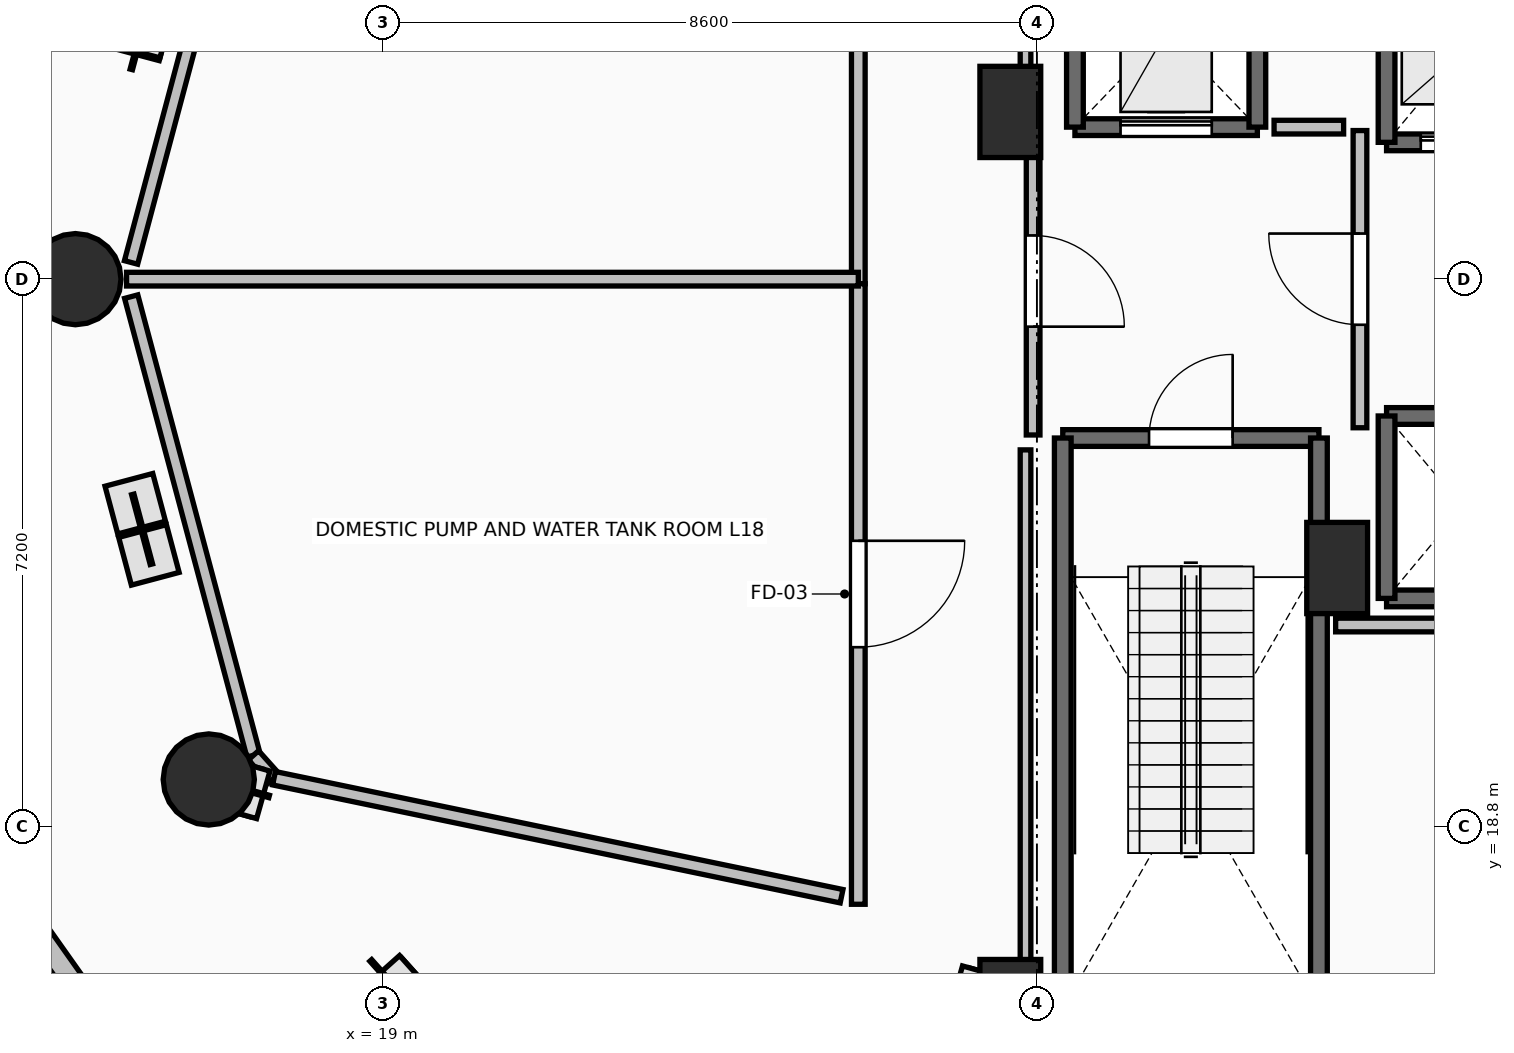
"""IFC4 building model, lengths in metres.
Left out: names, types, materials, properties, quantities, classifications, styles, units other than length and angle.
Written with IfcOpenShell. Run it as: python <this file> out.ifc"""

import sys

from ifc_helpers import new_model, si_unit, direction, frame, frame_2d, origin, origin_2d, place, context, subcontext, project, spatial, rectangle, circle, extrude, element, fill, save


model = new_model("IFC4")
c1 = context("Model", 3, precision=1e-05, world=origin(), true_north=direction((0.0, 1.0)))
c2 = subcontext(c1, "Body", "Model", "MODEL_VIEW")
j1 = project(units=[si_unit("LENGTHUNIT", "METRE"), si_unit("PLANEANGLEUNIT", "RADIAN")], contexts=[c1])
p1 = place(None, origin())
s1 = spatial("IfcSite", under=j1, at=p1, CompositionType="ELEMENT")
p2 = place(p1, origin())
s2 = spatial("IfcBuilding", under=s1, at=p2, CompositionType="ELEMENT")
p3 = place(p2, frame((0.0, 0.0, 69.5)))
s3 = spatial("IfcBuildingStorey", under=s2, at=p3, CompositionType="ELEMENT", Elevation=69.5)
for number, where, z_axis, x_axis in (
    (1, (14.95, 26.0, 0.0), (0.0, 0.0, 1.0), (-1.0, 0.0, 0.0)),
    (2, (16.705, 19.418, 0.0), (0.0, 0.0, 1.0), (-0.924, -0.383, 0.0)),
):
    element("IfcColumn", number, at=place(p3, frame(where, z_axis=z_axis, x_axis=x_axis)), inside=s3, PredefinedType="COLUMN", context=c2, shape_type="SweptSolid", body=[
        extrude(circle(Radius=0.6, at=origin_2d()), origin(), (0.0, 0.0, 1.0), 4.8),
    ])
for number, where, z_axis, x_axis in (
    (3, (27.25, 16.45, 0.0), (0.0, 0.0, 1.0), (1.0, 0.0, 0.0)),
    (4, (27.25, 28.2, 0.0), (0.0, 0.0, 1.0), (1.0, 0.0, 0.0)),
    (5, (31.55, 22.2, 0.0), (0.0, 0.0, 1.0), (1.0, 0.0, 0.0)),
):
    element("IfcColumn", number, at=place(p3, frame(where, z_axis=z_axis, x_axis=x_axis)), inside=s3, PredefinedType="PILASTER", context=c2, shape_type="SweptSolid", body=[
        extrude(rectangle(XDim=0.8, YDim=1.2, at=origin_2d()), origin(), (0.0, 0.0, 1.0), 4.8),
    ])
p4 = place(p3, frame((13.748, 18.404, 0.0), z_axis=(0.0, 0.0, 1.0), x_axis=(0.57716435238, -0.81662801222, 0.0)))
e6 = element("IfcWall", 6, at=p4, inside=s3, PredefinedType="STANDARD", context=c2, shape_type="SweptSolid", body=[
    extrude(rectangle(XDim=4.202, YDim=0.3, at=frame_2d((2.101, 0.0))), origin(), (0.0, 0.0, 1.0), 4.5),
])
p5 = place(p3, frame((27.94, 23.91, 0.0), z_axis=(0.0, 0.0, 1.0), x_axis=(1.0, 0.0, 0.0)))
e7 = element("IfcWall", 7, at=p5, inside=s3, PredefinedType="SOLIDWALL", context=c2, shape_type="SweptSolid", body=[
    extrude(rectangle(XDim=3.37, YDim=0.22, at=frame_2d((1.685, 0.0))), origin(), (0.0, 0.0, 1.0), 4.5),
])
p6 = place(p5, frame((1.135, 0.0, 0.0)))
e8 = element("IfcOpeningElement", 8, at=p6, cuts=e7, PredefinedType="OPENING", context=c2, shape_type="SweptSolid", body=[
    extrude(rectangle(XDim=1.1, YDim=2.15, at=frame_2d((0.55, 1.075))), frame((0.0, 0.125, 0.0), z_axis=(0.0, -1.0, 0.0), x_axis=(1.0, 0.0, 0.0)), (0.0, 0.0, 1.0), 0.25),
])
for number, where, z_axis, x_axis in (
    (9, (31.31, 23.91, 0.0), (0.0, 0.0, 1.0), (0.0, -1.0, 0.0)),
    (10, (27.94, 16.49, 0.0), (0.0, 0.0, 1.0), (0.0, 1.0, 0.0)),
):
    element("IfcWall", number, at=place(p3, frame(where, z_axis=z_axis, x_axis=x_axis)), inside=s3, PredefinedType="SOLIDWALL", context=c2, shape_type="SweptSolid", body=[
        extrude(rectangle(XDim=7.42, YDim=0.22, at=frame_2d((3.71, 0.0))), origin(), (0.0, 0.0, 1.0), 4.5),
    ])
p7 = place(p3, frame((32.2, 27.8, 0.0), z_axis=(0.0, 0.0, 1.0), x_axis=(1.0, 0.0, 0.0)))
e11 = element("IfcWall", 11, at=p7, inside=s3, PredefinedType="SOLIDWALL", context=c2, shape_type="SweptSolid", body=[
    extrude(rectangle(XDim=2.0, YDim=0.22, at=frame_2d((1.0, 0.0))), origin(), (0.0, 0.0, 1.0), 4.5),
])
p8 = place(p7, frame((0.45, 0.0, 0.0)))
e12 = element("IfcOpeningElement", 12, at=p8, cuts=e11, PredefinedType="OPENING", context=c2, shape_type="SweptSolid", body=[
    extrude(rectangle(XDim=1.1, YDim=2.2, at=frame_2d((0.55, 1.1))), frame((0.0, 0.125, 0.0), z_axis=(0.0, -1.0, 0.0), x_axis=(1.0, 0.0, 0.0)), (0.0, 0.0, 1.0), 0.25),
])
p9 = place(p3, frame((32.2, 30.2, 0.0), z_axis=(0.0, 0.0, 1.0), x_axis=(0.0, -1.0, 0.0)))
e13 = element("IfcWall", 13, at=p9, inside=s3, PredefinedType="SOLIDWALL", context=c2, shape_type="SweptSolid", body=[
    extrude(rectangle(XDim=2.4, YDim=0.22, at=frame_2d((1.2, 0.0))), origin(), (0.0, 0.0, 1.0), 4.5),
])
for number, where, z_axis, x_axis in (
    (14, (32.2, 21.8, 0.0), (0.0, 0.0, 1.0), (1.0, 0.0, 0.0)),
    (15, (34.2, 24.2, 0.0), (0.0, 0.0, 1.0), (-1.0, 0.0, 0.0)),
):
    element("IfcWall", number, at=place(p3, frame(where, z_axis=z_axis, x_axis=x_axis)), inside=s3, PredefinedType="SOLIDWALL", context=c2, shape_type="SweptSolid", body=[
        extrude(rectangle(XDim=2.0, YDim=0.22, at=frame_2d((1.0, 0.0))), origin(), (0.0, 0.0, 1.0), 4.5),
    ])
p10 = place(p3, frame((32.2, 24.2, 0.0), z_axis=(0.0, 0.0, 1.0), x_axis=(0.0, -1.0, 0.0)))
e16 = element("IfcWall", 16, at=p10, inside=s3, PredefinedType="SOLIDWALL", context=c2, shape_type="SweptSolid", body=[
    extrude(rectangle(XDim=2.4, YDim=0.22, at=frame_2d((1.2, 0.0))), origin(), (0.0, 0.0, 1.0), 4.5),
])
p11 = place(p3, frame((28.1, 28.0, 0.0), z_axis=(0.0, 0.0, 1.0), x_axis=(1.0, 0.0, 0.0)))
e17 = element("IfcWall", 17, at=p11, inside=s3, PredefinedType="SHEAR", context=c2, shape_type="SweptSolid", body=[
    extrude(rectangle(XDim=2.4, YDim=0.22, at=frame_2d((1.2, 0.0))), origin(), (0.0, 0.0, 1.0), 4.5),
])
p12 = place(p11, frame((0.6, 0.0, 0.0)))
e18 = element("IfcOpeningElement", 18, at=p12, cuts=e17, PredefinedType="OPENING", context=c2, shape_type="SweptSolid", body=[
    extrude(rectangle(XDim=1.2, YDim=2.2, at=frame_2d((0.6, 1.1))), frame((0.0, 0.125, 0.0), z_axis=(0.0, -1.0, 0.0), x_axis=(1.0, 0.0, 0.0)), (0.0, 0.0, 1.0), 0.25),
])
for number, where, z_axis, x_axis in (
    (19, (30.5, 28.0, 0.0), (0.0, 0.0, 1.0), (0.0, 1.0, 0.0)),
    (20, (28.1, 30.5, 0.0), (0.0, 0.0, 1.0), (0.0, -1.0, 0.0)),
):
    element("IfcWall", number, at=place(p3, frame(where, z_axis=z_axis, x_axis=x_axis)), inside=s3, PredefinedType="SHEAR", context=c2, shape_type="SweptSolid", body=[
        extrude(rectangle(XDim=2.5, YDim=0.22, at=frame_2d((1.25, 0.0))), origin(), (0.0, 0.0, 1.0), 4.5),
    ])
p13 = place(p3, frame((31.85, 24.045, 0.0), z_axis=(0.0, 0.0, 1.0), x_axis=(0.0, 1.0, 0.0)))
e21 = element("IfcWall", 21, at=p13, inside=s3, PredefinedType="PARTITIONING", context=c2, shape_type="SweptSolid", body=[
    extrude(rectangle(XDim=3.91, YDim=0.18, at=frame_2d((1.955, 0.0))), origin(), (0.0, 0.0, 1.0), 4.5),
])
p14 = place(p13, frame((1.355, 0.0, 0.0)))
e22 = element("IfcOpeningElement", 22, at=p14, cuts=e21, PredefinedType="OPENING", context=c2, shape_type="SweptSolid", body=[
    extrude(rectangle(XDim=1.2, YDim=2.15, at=frame_2d((0.6, 1.075))), frame((0.0, 0.105, 0.0), z_axis=(0.0, -1.0, 0.0), x_axis=(1.0, 0.0, 0.0)), (0.0, 0.0, 1.0), 0.21),
])
p15 = place(p3, frame((27.55, 28.0, 0.0), z_axis=(0.0, 0.0, 1.0), x_axis=(0.0, -1.0, 0.0)))
e23 = element("IfcWall", 23, at=p15, inside=s3, PredefinedType="PARTITIONING", context=c2, shape_type="SweptSolid", body=[
    extrude(rectangle(XDim=4.05, YDim=0.18, at=frame_2d((2.025, 0.0))), origin(), (0.0, 0.0, 1.0), 3.482),
])
p16 = place(p15, frame((1.425, 0.0, 0.0)))
e24 = element("IfcOpeningElement", 24, at=p16, cuts=e23, PredefinedType="OPENING", context=c2, shape_type="SweptSolid", body=[
    extrude(rectangle(XDim=1.2, YDim=2.15, at=frame_2d((0.6, 1.075))), frame((0.0, 0.105, 0.0), z_axis=(0.0, -1.0, 0.0), x_axis=(1.0, 0.0, 0.0)), (0.0, 0.0, 1.0), 0.21),
])
p17 = place(p3, frame((25.25, 34.069, 0.0), z_axis=(0.0, 0.0, 1.0), x_axis=(0.0, -1.0, 0.0)))
e25 = element("IfcWall", 25, at=p17, inside=s3, PredefinedType="PARTITIONING", context=c2, shape_type="SweptSolid", body=[
    extrude(rectangle(XDim=8.129, YDim=0.18, at=frame_2d((4.064, 0.0))), origin(), (0.0, 0.0, 1.0), 3.482),
])
p18 = place(p17, frame((3.365, 0.0, 0.0)))
e26 = element("IfcOpeningElement", 26, at=p18, cuts=e25, PredefinedType="OPENING", context=c2, shape_type="SweptSolid", body=[
    extrude(rectangle(XDim=1.4, YDim=2.2, at=frame_2d((0.7, 1.1))), frame((0.0, 0.105, 0.0), z_axis=(0.0, -1.0, 0.0), x_axis=(1.0, 0.0, 0.0)), (0.0, 0.0, 1.0), 0.21),
])
p19 = place(p3, frame((25.25, 25.94, 0.0), z_axis=(0.0, 0.0, 1.0), x_axis=(0.0, -1.0, 0.0)))
e27 = element("IfcWall", 27, at=p19, inside=s3, PredefinedType="PARTITIONING", context=c2, shape_type="SweptSolid", body=[
    extrude(rectangle(XDim=8.164, YDim=0.18, at=frame_2d((4.082, 0.0))), origin(), (0.0, 0.0, 1.0), 4.5),
])
p20 = place(p19, frame((3.382, 0.0, 0.0)))
e28 = element("IfcOpeningElement", 28, at=p20, cuts=e27, PredefinedType="OPENING", context=c2, shape_type="SweptSolid", body=[
    extrude(rectangle(XDim=1.4, YDim=2.2, at=frame_2d((0.7, 1.1))), frame((0.0, 0.105, 0.0), z_axis=(0.0, -1.0, 0.0), x_axis=(1.0, 0.0, 0.0)), (0.0, 0.0, 1.0), 0.21),
])
p21 = place(p3, frame((15.623, 26.0, 0.0), z_axis=(0.0, 0.0, 1.0), x_axis=(1.0, 0.0, 0.0)))
e29 = element("IfcWall", 29, at=p21, inside=s3, PredefinedType="PARTITIONING", context=c2, shape_type="SweptSolid", body=[
    extrude(rectangle(XDim=9.627, YDim=0.18, at=frame_2d((4.813, 0.0))), origin(), (0.0, 0.0, 1.0), 3.482),
])
p22 = place(p3, frame((31.635, 28.0, 0.0), z_axis=(0.0, 0.0, 1.0), x_axis=(-1.0, 0.0, 0.0)))
e30 = element("IfcWall", 30, at=p22, inside=s3, PredefinedType="PARTITIONING", context=c2, shape_type="SweptSolid", body=[
    extrude(rectangle(XDim=0.915, YDim=0.18, at=frame_2d((0.458, 0.0))), origin(), (0.0, 0.0, 1.0), 4.5),
])
p23 = place(p3, frame((36.439, 21.45, 0.0), z_axis=(0.0, 0.0, 1.0), x_axis=(-1.0, 0.0, 0.0)))
e31 = element("IfcWall", 31, at=p23, inside=s3, PredefinedType="PARTITIONING", context=c2, shape_type="SweptSolid", body=[
    extrude(rectangle(XDim=4.909, YDim=0.18, at=frame_2d((2.455, 0.0))), origin(), (0.0, 0.0, 1.0), 4.5),
])
p24 = place(p3, frame((27.45, 16.24, 0.0), z_axis=(0.0, 0.0, 1.0), x_axis=(0.0, 1.0, 0.0)))
e32 = element("IfcWall", 32, at=p24, inside=s3, PredefinedType="PARTITIONING", context=c2, shape_type="SweptSolid", body=[
    extrude(rectangle(XDim=7.514, YDim=0.14, at=frame_2d((3.757, 0.0))), origin(), (0.0, 0.0, 1.0), 3.482),
])
p25 = place(p3, frame((27.45, 28.196, 0.0), z_axis=(0.0, 0.0, 1.0), x_axis=(0.0, 1.0, 0.0)))
e33 = element("IfcWall", 33, at=p25, inside=s3, PredefinedType="PARTITIONING", context=c2, shape_type="SweptSolid", body=[
    extrude(rectangle(XDim=5.254, YDim=0.14, at=frame_2d((2.627, 0.0))), origin(), (0.0, 0.0, 1.0), 3.482),
])
p26 = place(p3, frame((17.293, 32.264, 0.0), z_axis=(0.0, 0.0, 1.0), x_axis=(-0.257567905164, -0.966260200065, 0.0)))
e34 = element("IfcWall", 34, at=p26, inside=s3, PredefinedType="PARTITIONING", context=c2, shape_type="SweptSolid", body=[
    extrude(rectangle(XDim=6.255, YDim=0.18, at=frame_2d((3.127, 0.0))), origin(), (0.0, 0.0, 1.0), 3.482),
])
p27 = place(p3, frame((15.684, 25.77, 0.0), z_axis=(0.0, 0.0, 1.0), x_axis=(0.257638317277, -0.966241428149, 0.0)))
e35 = element("IfcWall", 35, at=p27, inside=s3, PredefinedType="PARTITIONING", context=c2, shape_type="SweptSolid", body=[
    extrude(rectangle(XDim=6.245, YDim=0.18, at=frame_2d((3.122, 0.0))), origin(), (0.0, 0.0, 1.0), 4.5),
])
p28 = place(p3, frame((17.293, 19.736, 0.0), z_axis=(0.0, 0.0, 1.0), x_axis=(0.666530578837, -0.745477690797, 0.0)))
e36 = element("IfcWall", 36, at=p28, inside=s3, PredefinedType="PARTITIONING", context=c2, shape_type="SweptSolid", body=[
    extrude(rectangle(XDim=0.405, YDim=0.18, at=frame_2d((0.203, 0.0))), origin(), (0.0, 0.0, 1.0), 3.482),
])
p29 = place(p3, frame((17.563, 19.434, 0.0), z_axis=(0.0, 0.0, 1.0), x_axis=(0.979075389476, -0.203497866631, 0.0)))
e37 = element("IfcWall", 37, at=p29, inside=s3, PredefinedType="PARTITIONING", context=c2, shape_type="SweptSolid", body=[
    extrude(rectangle(XDim=7.627, YDim=0.18, at=frame_2d((3.813, 0.0))), origin(), (0.0, 0.0, 1.0), 3.482),
])
p30 = place(p6, origin())
e38 = element("IfcDoor", 38, at=p30, inside=s3, OperationType="SINGLE_SWING_RIGHT", PredefinedType="DOOR", context=c2, shape_type="SweptSolid", body=[
    extrude(rectangle(XDim=1.1, YDim=2.15, at=frame_2d((0.55, 1.075))), frame((0.0, 0.025, 0.0), z_axis=(0.0, -1.0, 0.0), x_axis=(1.0, 0.0, 0.0)), (0.0, 0.0, 1.0), 0.05),
])
fill(e8, e38)
p31 = place(p8, origin())
e39 = element("IfcDoor", 39, at=p31, inside=s3, OperationType="SLIDING_TO_LEFT", PredefinedType="DOOR", context=c2, shape_type="SweptSolid", body=[
    extrude(rectangle(XDim=1.1, YDim=2.2, at=frame_2d((0.55, 1.1))), frame((0.0, 0.025, 0.0), z_axis=(0.0, -1.0, 0.0), x_axis=(1.0, 0.0, 0.0)), (0.0, 0.0, 1.0), 0.05),
])
fill(e12, e39)
p32 = place(p12, origin())
e40 = element("IfcDoor", 40, at=p32, inside=s3, OperationType="SLIDING_TO_LEFT", PredefinedType="DOOR", context=c2, shape_type="SweptSolid", body=[
    extrude(rectangle(XDim=1.2, YDim=2.2, at=frame_2d((0.6, 1.1))), frame((0.0, 0.025, 0.0), z_axis=(0.0, -1.0, 0.0), x_axis=(1.0, 0.0, 0.0)), (0.0, 0.0, 1.0), 0.05),
])
fill(e18, e40)
p33 = place(p14, origin())
e41 = element("IfcDoor", 41, at=p33, inside=s3, OperationType="SINGLE_SWING_RIGHT", PredefinedType="DOOR", context=c2, shape_type="SweptSolid", body=[
    extrude(rectangle(XDim=1.2, YDim=2.15, at=frame_2d((0.6, 1.075))), frame((0.0, 0.025, 0.0), z_axis=(0.0, -1.0, 0.0), x_axis=(1.0, 0.0, 0.0)), (0.0, 0.0, 1.0), 0.05),
])
fill(e22, e41)
p34 = place(p16, origin())
e42 = element("IfcDoor", 42, at=p34, inside=s3, OperationType="SINGLE_SWING_RIGHT", PredefinedType="DOOR", context=c2, shape_type="SweptSolid", body=[
    extrude(rectangle(XDim=1.2, YDim=2.15, at=frame_2d((0.6, 1.075))), frame((0.0, 0.025, 0.0), z_axis=(0.0, -1.0, 0.0), x_axis=(1.0, 0.0, 0.0)), (0.0, 0.0, 1.0), 0.05),
])
fill(e24, e42)
p35 = place(p20, origin())
e43 = element("IfcDoor", 43, at=p35, inside=s3, OperationType="DOUBLE_SWING_LEFT", PredefinedType="DOOR", context=c2, shape_type="SweptSolid", body=[
    extrude(rectangle(XDim=1.4, YDim=2.2, at=frame_2d((0.7, 1.1))), frame((0.0, 0.025, 0.0), z_axis=(0.0, -1.0, 0.0), x_axis=(1.0, 0.0, 0.0)), (0.0, 0.0, 1.0), 0.05),
])
fill(e28, e43)
save(model, sys.argv[1])
